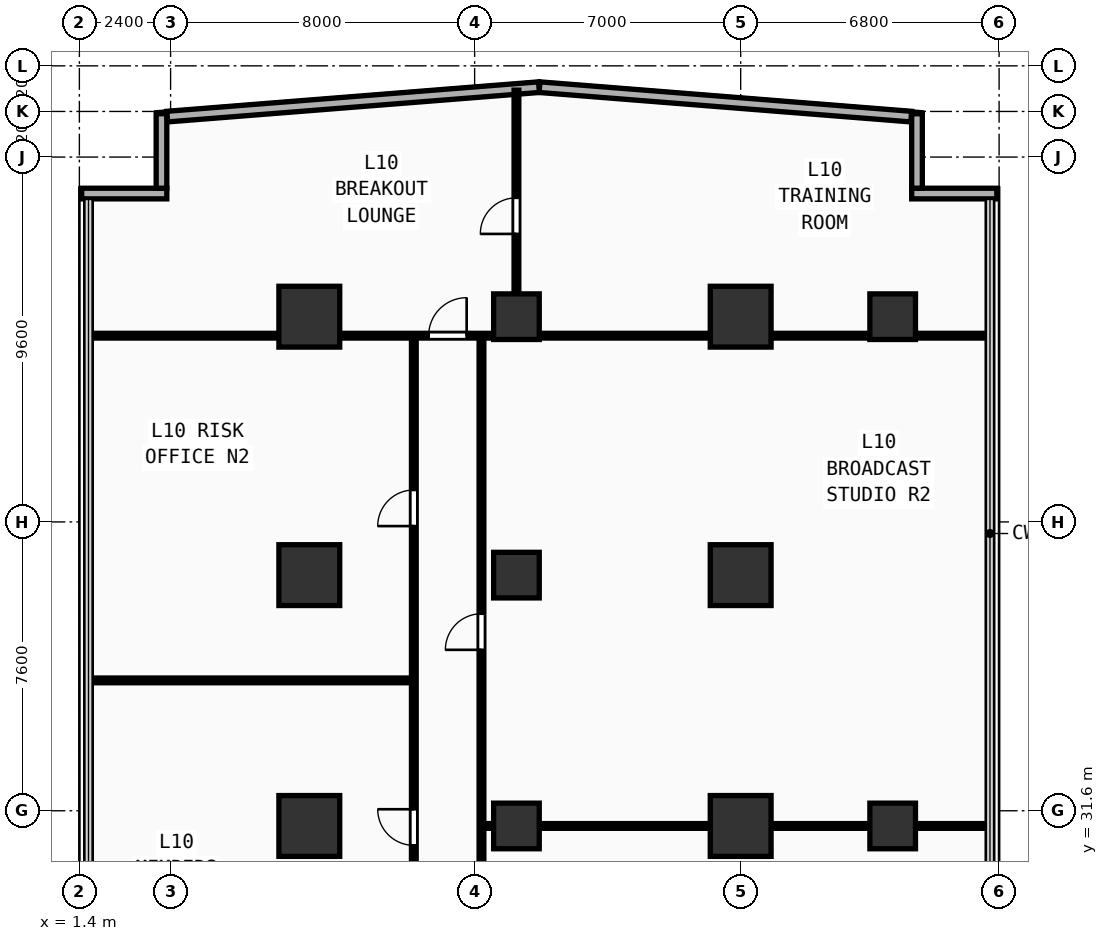
"""IFC4 building model, lengths in metres.
Left out: names, types, materials, properties, quantities, classifications, styles, units other than length and angle.
Written with IfcOpenShell. Run it as: python <this file> out.ifc"""

import sys

from ifc_helpers import new_model, si_unit, direction, frame, frame_2d, origin, origin_2d, place, context, subcontext, project, spatial, rectangle, extrude, element, fill, save


model = new_model("IFC4")
c1 = context("Model", 3, precision=1e-05, world=origin(), true_north=direction((0.0, 1.0)))
c2 = subcontext(c1, "Body", "Model", "MODEL_VIEW")
j1 = project(units=[si_unit("LENGTHUNIT", "METRE"), si_unit("PLANEANGLEUNIT", "RADIAN")], contexts=[c1])
p1 = place(None, origin())
s1 = spatial("IfcSite", under=j1, at=p1, CompositionType="ELEMENT")
p2 = place(p1, origin())
s2 = spatial("IfcBuilding", under=s1, at=p2, CompositionType="ELEMENT")
p3 = place(p2, frame((0.0, 0.0, 41.0)))
s3 = spatial("IfcBuildingStorey", under=s2, at=p3, CompositionType="ELEMENT", Elevation=41.0)
for number, where, z_axis, x_axis in (
    (1, (7.45, 31.2, 0.0), (0.0, 0.0, 1.0), (1.0, 0.0, 0.0)),
    (2, (7.45, 37.8, 0.0), (0.0, 0.0, 1.0), (1.0, 0.0, 0.0)),
    (3, (7.45, 44.6, 0.0), (0.0, 0.0, 1.0), (1.0, 0.0, 0.0)),
    (4, (18.8, 31.2, 0.0), (0.0, 0.0, 1.0), (1.0, 0.0, 0.0)),
    (5, (18.8, 37.8, 0.0), (0.0, 0.0, 1.0), (1.0, 0.0, 0.0)),
    (6, (18.8, 44.6, 0.0), (0.0, 0.0, 1.0), (1.0, 0.0, 0.0)),
):
    element("IfcColumn", number, at=place(p3, frame(where, z_axis=z_axis, x_axis=x_axis)), inside=s3, PredefinedType="COLUMN", context=c2, shape_type="SweptSolid", body=[
        extrude(rectangle(XDim=1.6, YDim=1.6, at=origin_2d()), origin(), (0.0, 0.0, 1.0), 3.54),
    ])
for number, where, z_axis, x_axis in (
    (7, (22.8, 31.2, 0.0), (0.0, 0.0, 1.0), (1.0, 0.0, 0.0)),
    (8, (22.8, 44.6, 0.0), (0.0, 0.0, 1.0), (1.0, 0.0, 0.0)),
    (9, (12.9, 31.2, 0.0), (0.0, 0.0, 1.0), (1.0, 0.0, 0.0)),
    (10, (12.9, 37.8, 0.0), (0.0, 0.0, 1.0), (1.0, 0.0, 0.0)),
    (11, (12.9, 44.6, 0.0), (0.0, 0.0, 1.0), (1.0, 0.0, 0.0)),
):
    element("IfcColumn", number, at=place(p3, frame(where, z_axis=z_axis, x_axis=x_axis)), inside=s3, PredefinedType="COLUMN", context=c2, shape_type="SweptSolid", body=[
        extrude(rectangle(XDim=1.2, YDim=1.2, at=origin_2d()), origin(), (0.0, 0.0, 1.0), 3.54),
    ])
p4 = place(p3, frame((23.3, 47.84, 0.0), z_axis=(0.0, 0.0, 1.0), x_axis=(1.0, 0.0, 0.0)))
e12 = element("IfcWall", 12, at=p4, inside=s3, PredefinedType="SOLIDWALL", context=c2, shape_type="SweptSolid", body=[
    extrude(rectangle(XDim=2.24, YDim=0.28, at=frame_2d((1.12, 0.0))), origin(), (0.0, 0.0, 1.0), 3.54),
])
p5 = place(p3, frame((23.44, 47.98, 0.0), z_axis=(0.0, 0.0, 1.0), x_axis=(0.0, 1.0, 0.0)))
e13 = element("IfcWall", 13, at=p5, inside=s3, PredefinedType="SOLIDWALL", context=c2, shape_type="SweptSolid", body=[
    extrude(rectangle(XDim=1.96, YDim=0.28, at=frame_2d((0.98, 0.0))), origin(), (0.0, 0.0, 1.0), 3.54),
])
p6 = place(p3, frame((1.46, 47.84, 0.0), z_axis=(0.0, 0.0, 1.0), x_axis=(1.0, 0.0, 0.0)))
e14 = element("IfcWall", 14, at=p6, inside=s3, PredefinedType="SOLIDWALL", context=c2, shape_type="SweptSolid", body=[
    extrude(rectangle(XDim=2.24, YDim=0.28, at=frame_2d((1.12, 0.0))), origin(), (0.0, 0.0, 1.0), 3.54),
])
p7 = place(p3, frame((3.56, 47.98, 0.0), z_axis=(0.0, 0.0, 1.0), x_axis=(0.0, 1.0, 0.0)))
e15 = element("IfcWall", 15, at=p7, inside=s3, PredefinedType="SOLIDWALL", context=c2, shape_type="SweptSolid", body=[
    extrude(rectangle(XDim=1.96, YDim=0.28, at=frame_2d((0.98, 0.0))), origin(), (0.0, 0.0, 1.0), 3.54),
])
for number, where, z_axis, x_axis in (
    (16, (23.288, 49.864, 0.0), (0.0, 0.0, 1.0), (-0.997, 0.079, 0.0)),
    (17, (13.493, 50.639, 0.0), (0.0, 0.0, 1.0), (-0.997, -0.079, 0.0)),
):
    element("IfcWall", number, at=place(p3, frame(where, z_axis=z_axis, x_axis=x_axis)), inside=s3, PredefinedType="SOLIDWALL", context=c2, shape_type="SweptSolid", body=[
        extrude(rectangle(XDim=9.812, YDim=0.28, at=frame_2d((4.906, 0.0))), origin(), (0.0, 0.0, 1.0), 3.54),
    ])
p8 = place(p3, frame((10.2, 27.3, 0.0), z_axis=(0.0, 0.0, 1.0), x_axis=(0.0, 1.0, 0.0)))
e18 = element("IfcWall", 18, at=p8, inside=s3, PredefinedType="PARTITIONING", context=c2, shape_type="SweptSolid", body=[
    extrude(rectangle(XDim=16.8, YDim=0.125, at=frame_2d((8.4, 0.0))), origin(), (0.0, 0.0, 1.0), 3.54),
])
p9 = place(p8, frame((3.39, 0.0, 0.0)))
e19 = element("IfcOpeningElement", 19, at=p9, cuts=e18, PredefinedType="OPENING", context=c2, shape_type="SweptSolid", body=[
    extrude(rectangle(XDim=0.95, YDim=2.15, at=frame_2d((0.475, 1.075))), frame((0.0, 0.073, 0.0), z_axis=(0.0, -1.0, 0.0), x_axis=(1.0, 0.0, 0.0)), (0.0, 0.0, 1.0), 0.145),
])
p10 = place(p8, frame((11.79, 0.0, 0.0)))
e20 = element("IfcOpeningElement", 20, at=p10, cuts=e18, PredefinedType="OPENING", context=c2, shape_type="SweptSolid", body=[
    extrude(rectangle(XDim=0.95, YDim=2.15, at=frame_2d((0.475, 1.075))), frame((0.0, 0.073, 0.0), z_axis=(0.0, -1.0, 0.0), x_axis=(1.0, 0.0, 0.0)), (0.0, 0.0, 1.0), 0.145),
])
p11 = place(p3, frame((1.64, 35.03, 0.0), z_axis=(0.0, 0.0, 1.0), x_axis=(1.0, 0.0, 0.0)))
e21 = element("IfcWall", 21, at=p11, inside=s3, PredefinedType="PARTITIONING", context=c2, shape_type="SweptSolid", body=[
    extrude(rectangle(XDim=8.56, YDim=0.125, at=frame_2d((4.28, 0.0))), origin(), (0.0, 0.0, 1.0), 3.54),
])
p12 = place(p3, frame((1.64, 44.1, 0.0), z_axis=(0.0, 0.0, 1.0), x_axis=(1.0, 0.0, 0.0)))
e22 = element("IfcWall", 22, at=p12, inside=s3, PredefinedType="PARTITIONING", context=c2, shape_type="SweptSolid", body=[
    extrude(rectangle(XDim=23.72, YDim=0.125, at=frame_2d((11.86, 0.0))), origin(), (0.0, 0.0, 1.0), 3.54),
])
p13 = place(p12, frame((8.95, 0.0, 0.0)))
e23 = element("IfcOpeningElement", 23, at=p13, cuts=e22, PredefinedType="OPENING", context=c2, shape_type="SweptSolid", body=[
    extrude(rectangle(XDim=1.0, YDim=2.2, at=frame_2d((0.5, 1.1))), frame((0.0, 0.073, 0.0), z_axis=(0.0, -1.0, 0.0), x_axis=(1.0, 0.0, 0.0)), (0.0, 0.0, 1.0), 0.145),
])
p14 = place(p3, frame((12.9, 44.1, 0.0), z_axis=(0.0, 0.0, 1.0), x_axis=(0.0, 1.0, 0.0)))
e24 = element("IfcWall", 24, at=p14, inside=s3, PredefinedType="PARTITIONING", context=c2, shape_type="SweptSolid", body=[
    extrude(rectangle(XDim=6.46, YDim=0.125, at=frame_2d((3.23, 0.0))), origin(), (0.0, 0.0, 1.0), 2.94),
])
p15 = place(p14, frame((2.677, 0.0, 0.0)))
e25 = element("IfcOpeningElement", 25, at=p15, cuts=e24, PredefinedType="OPENING", context=c2, shape_type="SweptSolid", body=[
    extrude(rectangle(XDim=0.95, YDim=2.15, at=frame_2d((0.475, 1.075))), frame((0.0, 0.073, 0.0), z_axis=(0.0, -1.0, 0.0), x_axis=(1.0, 0.0, 0.0)), (0.0, 0.0, 1.0), 0.145),
])
p16 = place(p3, frame((11.98, 27.3, 0.0), z_axis=(0.0, 0.0, 1.0), x_axis=(0.0, 1.0, 0.0)))
e26 = element("IfcWall", 26, at=p16, inside=s3, PredefinedType="PARTITIONING", context=c2, shape_type="SweptSolid", body=[
    extrude(rectangle(XDim=16.8, YDim=0.125, at=frame_2d((8.4, 0.0))), origin(), (0.0, 0.0, 1.0), 3.54),
])
p17 = place(p16, frame((1.403, 0.0, 0.0)))
e27 = element("IfcOpeningElement", 27, at=p17, cuts=e26, PredefinedType="OPENING", context=c2, shape_type="SweptSolid", body=[
    extrude(rectangle(XDim=0.95, YDim=2.15, at=frame_2d((0.475, 1.075))), frame((0.0, 0.073, 0.0), z_axis=(0.0, -1.0, 0.0), x_axis=(1.0, 0.0, 0.0)), (0.0, 0.0, 1.0), 0.145),
])
p18 = place(p16, frame((8.534, 0.0, 0.0)))
e28 = element("IfcOpeningElement", 28, at=p18, cuts=e26, PredefinedType="OPENING", context=c2, shape_type="SweptSolid", body=[
    extrude(rectangle(XDim=0.95, YDim=2.15, at=frame_2d((0.475, 1.075))), frame((0.0, 0.073, 0.0), z_axis=(0.0, -1.0, 0.0), x_axis=(1.0, 0.0, 0.0)), (0.0, 0.0, 1.0), 0.145),
])
p19 = place(p3, frame((11.98, 31.2, 0.0), z_axis=(0.0, 0.0, 1.0), x_axis=(1.0, 0.0, 0.0)))
e29 = element("IfcWall", 29, at=p19, inside=s3, PredefinedType="PARTITIONING", context=c2, shape_type="SweptSolid", body=[
    extrude(rectangle(XDim=13.38, YDim=0.125, at=frame_2d((6.69, 0.0))), origin(), (0.0, 0.0, 1.0), 2.94),
])
p20 = place(p9, origin())
e30 = element("IfcDoor", 30, at=p20, inside=s3, OperationType="SINGLE_SWING_RIGHT", PredefinedType="DOOR", context=c2, shape_type="SweptSolid", body=[
    extrude(rectangle(XDim=0.95, YDim=2.15, at=frame_2d((0.475, 1.075))), frame((0.0, 0.025, 0.0), z_axis=(0.0, -1.0, 0.0), x_axis=(1.0, 0.0, 0.0)), (0.0, 0.0, 1.0), 0.05),
])
fill(e19, e30)
p21 = place(p10, origin())
e31 = element("IfcDoor", 31, at=p21, inside=s3, OperationType="SINGLE_SWING_LEFT", PredefinedType="DOOR", context=c2, shape_type="SweptSolid", body=[
    extrude(rectangle(XDim=0.95, YDim=2.15, at=frame_2d((0.475, 1.075))), frame((0.0, 0.025, 0.0), z_axis=(0.0, -1.0, 0.0), x_axis=(1.0, 0.0, 0.0)), (0.0, 0.0, 1.0), 0.05),
])
fill(e20, e31)
p22 = place(p13, origin())
e32 = element("IfcDoor", 32, at=p22, inside=s3, OperationType="SINGLE_SWING_RIGHT", PredefinedType="DOOR", context=c2, shape_type="SweptSolid", body=[
    extrude(rectangle(XDim=1.0, YDim=2.2, at=frame_2d((0.5, 1.1))), frame((0.0, 0.025, 0.0), z_axis=(0.0, -1.0, 0.0), x_axis=(1.0, 0.0, 0.0)), (0.0, 0.0, 1.0), 0.05),
])
fill(e23, e32)
p23 = place(p15, origin())
e33 = element("IfcDoor", 33, at=p23, inside=s3, OperationType="SINGLE_SWING_LEFT", PredefinedType="DOOR", context=c2, shape_type="SweptSolid", body=[
    extrude(rectangle(XDim=0.95, YDim=2.15, at=frame_2d((0.475, 1.075))), frame((0.0, 0.025, 0.0), z_axis=(0.0, -1.0, 0.0), x_axis=(1.0, 0.0, 0.0)), (0.0, 0.0, 1.0), 0.05),
])
fill(e25, e33)
p24 = place(p18, origin())
e34 = element("IfcDoor", 34, at=p24, inside=s3, OperationType="SINGLE_SWING_LEFT", PredefinedType="DOOR", context=c2, shape_type="SweptSolid", body=[
    extrude(rectangle(XDim=0.95, YDim=2.15, at=frame_2d((0.475, 1.075))), frame((0.0, 0.025, 0.0), z_axis=(0.0, -1.0, 0.0), x_axis=(1.0, 0.0, 0.0)), (0.0, 0.0, 1.0), 0.05),
])
fill(e28, e34)
save(model, sys.argv[1])
